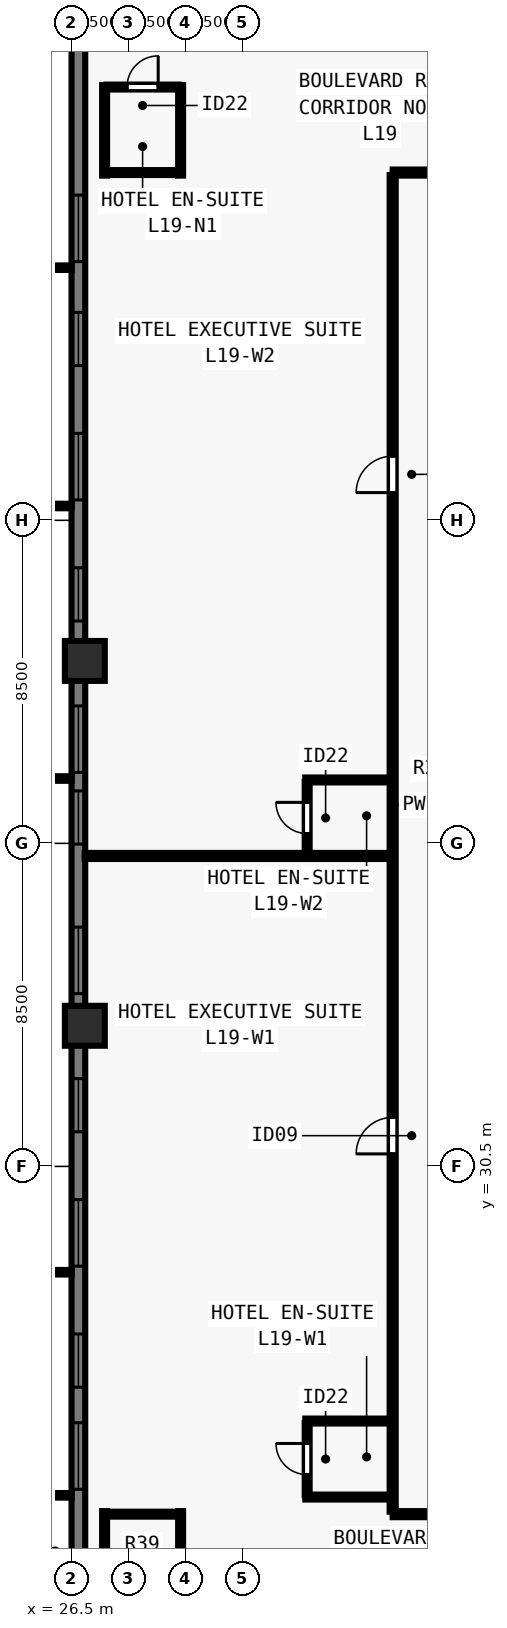
"""IFC4 building model, lengths in metres.
Left out: names, types, materials, properties, quantities, classifications, styles, units other than length and angle.
Written with IfcOpenShell. Run it as: python <this file> out.ifc"""

import sys

from ifc_helpers import new_model, si_unit, direction, frame, frame_2d, origin, origin_2d, place, context, subcontext, project, spatial, rectangle, extrude, element, fill, save


model = new_model("IFC4")
c1 = context("Model", 3, precision=1e-05, world=origin(), true_north=direction((0.0, 1.0)))
c2 = subcontext(c1, "Body", "Model", "MODEL_VIEW")
j1 = project(units=[si_unit("LENGTHUNIT", "METRE"), si_unit("PLANEANGLEUNIT", "RADIAN")], contexts=[c1])
p1 = place(None, origin())
s1 = spatial("IfcSite", under=j1, at=p1, CompositionType="ELEMENT")
p2 = place(p1, origin())
s2 = spatial("IfcBuilding", under=s1, at=p2, CompositionType="ELEMENT")
p3 = place(p2, frame((0.0, 0.0, 72.5)))
s3 = spatial("IfcBuildingStorey", under=s2, at=p3, CompositionType="ELEMENT", Elevation=72.5)
for number, where, z_axis, x_axis in (
    (1, (26.85, 43.8, 0.0), (0.0, 0.0, 1.0), (0.0, 1.0, 0.0)),
    (2, (26.85, 34.2, 0.0), (0.0, 0.0, 1.0), (0.0, 1.0, 0.0)),
):
    element("IfcColumn", number, at=place(p3, frame(where, z_axis=z_axis, x_axis=x_axis)), inside=s3, PredefinedType="COLUMN", context=c2, shape_type="SweptSolid", body=[
        extrude(rectangle(XDim=1.05, YDim=1.05, at=origin_2d()), origin(), (0.0, 0.0, 1.0), 3.5),
    ])
p4 = place(p3, frame((26.68, 16.5, 0.0), z_axis=(0.0, 0.0, 1.0), x_axis=(0.0, 1.0, 0.0)))
e3 = element("IfcWall", 3, at=p4, inside=s3, PredefinedType="SOLIDWALL", context=c2, shape_type="SweptSolid", body=[
    extrude(rectangle(XDim=44.662, YDim=0.36, at=frame_2d((22.331, 0.0))), origin(), (0.0, 0.0, 1.0), 3.28),
])
p5 = place(p4, frame((5.505, 0.0, 0.8)))
e4 = element("IfcOpeningElement", 4, at=p5, cuts=e3, PredefinedType="OPENING", context=c2, shape_type="SweptSolid", body=[
    extrude(rectangle(XDim=1.75, YDim=1.544, at=frame_2d((0.875, 0.772))), frame((0.0, 0.19, 0.0), z_axis=(0.0, -1.0, 0.0), x_axis=(1.0, 0.0, 0.0)), (0.0, 0.0, 1.0), 0.38),
])
p6 = place(p4, frame((8.19, 0.0, 0.8)))
e5 = element("IfcOpeningElement", 5, at=p6, cuts=e3, PredefinedType="OPENING", context=c2, shape_type="SweptSolid", body=[
    extrude(rectangle(XDim=1.4, YDim=1.544, at=frame_2d((0.7, 0.772))), frame((0.0, 0.19, 0.0), z_axis=(0.0, -1.0, 0.0), x_axis=(1.0, 0.0, 0.0)), (0.0, 0.0, 1.0), 0.38),
])
p7 = place(p4, frame((11.375, 0.0, 0.8)))
e6 = element("IfcOpeningElement", 6, at=p7, cuts=e3, PredefinedType="OPENING", context=c2, shape_type="SweptSolid", body=[
    extrude(rectangle(XDim=1.75, YDim=1.544, at=frame_2d((0.875, 0.772))), frame((0.0, 0.19, 0.0), z_axis=(0.0, -1.0, 0.0), x_axis=(1.0, 0.0, 0.0)), (0.0, 0.0, 1.0), 0.38),
])
p8 = place(p4, frame((14.911, 0.0, 0.8)))
e7 = element("IfcOpeningElement", 7, at=p8, cuts=e3, PredefinedType="OPENING", context=c2, shape_type="SweptSolid", body=[
    extrude(rectangle(XDim=1.4, YDim=1.544, at=frame_2d((0.7, 0.772))), frame((0.0, 0.19, 0.0), z_axis=(0.0, -1.0, 0.0), x_axis=(1.0, 0.0, 0.0)), (0.0, 0.0, 1.0), 0.38),
])
p9 = place(p4, frame((18.546, 0.0, 0.8)))
e8 = element("IfcOpeningElement", 8, at=p9, cuts=e3, PredefinedType="OPENING", context=c2, shape_type="SweptSolid", body=[
    extrude(rectangle(XDim=1.75, YDim=1.544, at=frame_2d((0.875, 0.772))), frame((0.0, 0.19, 0.0), z_axis=(0.0, -1.0, 0.0), x_axis=(1.0, 0.0, 0.0)), (0.0, 0.0, 1.0), 0.38),
])
p10 = place(p4, frame((22.481, 0.0, 0.8)))
e9 = element("IfcOpeningElement", 9, at=p10, cuts=e3, PredefinedType="OPENING", context=c2, shape_type="SweptSolid", body=[
    extrude(rectangle(XDim=1.4, YDim=1.544, at=frame_2d((0.7, 0.772))), frame((0.0, 0.19, 0.0), z_axis=(0.0, -1.0, 0.0), x_axis=(1.0, 0.0, 0.0)), (0.0, 0.0, 1.0), 0.38),
])
p11 = place(p4, frame((24.366, 0.0, 0.8)))
e10 = element("IfcOpeningElement", 10, at=p11, cuts=e3, PredefinedType="OPENING", context=c2, shape_type="SweptSolid", body=[
    extrude(rectangle(XDim=1.75, YDim=1.544, at=frame_2d((0.875, 0.772))), frame((0.0, 0.19, 0.0), z_axis=(0.0, -1.0, 0.0), x_axis=(1.0, 0.0, 0.0)), (0.0, 0.0, 1.0), 0.38),
])
p12 = place(p4, frame((28.351, 0.0, 0.8)))
e11 = element("IfcOpeningElement", 11, at=p12, cuts=e3, PredefinedType="OPENING", context=c2, shape_type="SweptSolid", body=[
    extrude(rectangle(XDim=1.4, YDim=1.544, at=frame_2d((0.7, 0.772))), frame((0.0, 0.19, 0.0), z_axis=(0.0, -1.0, 0.0), x_axis=(1.0, 0.0, 0.0)), (0.0, 0.0, 1.0), 0.38),
])
p13 = place(p4, frame((31.537, 0.0, 0.8)))
e12 = element("IfcOpeningElement", 12, at=p13, cuts=e3, PredefinedType="OPENING", context=c2, shape_type="SweptSolid", body=[
    extrude(rectangle(XDim=1.75, YDim=1.544, at=frame_2d((0.875, 0.772))), frame((0.0, 0.19, 0.0), z_axis=(0.0, -1.0, 0.0), x_axis=(1.0, 0.0, 0.0)), (0.0, 0.0, 1.0), 0.38),
])
p14 = place(p4, frame((35.072, 0.0, 0.8)))
e13 = element("IfcOpeningElement", 13, at=p14, cuts=e3, PredefinedType="OPENING", context=c2, shape_type="SweptSolid", body=[
    extrude(rectangle(XDim=1.4, YDim=1.544, at=frame_2d((0.7, 0.772))), frame((0.0, 0.19, 0.0), z_axis=(0.0, -1.0, 0.0), x_axis=(1.0, 0.0, 0.0)), (0.0, 0.0, 1.0), 0.38),
])
p15 = place(p4, frame((37.807, 0.0, 0.8)))
e14 = element("IfcOpeningElement", 14, at=p15, cuts=e3, PredefinedType="OPENING", context=c2, shape_type="SweptSolid", body=[
    extrude(rectangle(XDim=1.75, YDim=1.544, at=frame_2d((0.875, 0.772))), frame((0.0, 0.19, 0.0), z_axis=(0.0, -1.0, 0.0), x_axis=(1.0, 0.0, 0.0)), (0.0, 0.0, 1.0), 0.38),
])
p16 = place(p3, frame((34.95, 21.35, 0.0), z_axis=(0.0, 0.0, 1.0), x_axis=(1.0, 0.0, 0.0)))
e15 = element("IfcWall", 15, at=p16, inside=s3, PredefinedType="PARTITIONING", context=c2, shape_type="SweptSolid", body=[
    extrude(rectangle(XDim=34.1, YDim=0.16, at=frame_2d((17.05, 0.0))), origin(), (0.0, 0.0, 1.0), 3.28),
])
p17 = place(p16, frame((3.614, 0.0, 0.0)))
e16 = element("IfcOpeningElement", 16, at=p17, cuts=e15, PredefinedType="OPENING", context=c2, shape_type="SweptSolid", body=[
    extrude(rectangle(XDim=0.96, YDim=2.15, at=frame_2d((0.48, 1.075))), frame((0.0, 0.09, 0.0), z_axis=(0.0, -1.0, 0.0), x_axis=(1.0, 0.0, 0.0)), (0.0, 0.0, 1.0), 0.18),
])
p18 = place(p16, frame((17.56, 0.0, 0.0)))
e17 = element("IfcOpeningElement", 17, at=p18, cuts=e15, PredefinedType="OPENING", context=c2, shape_type="SweptSolid", body=[
    extrude(rectangle(XDim=0.96, YDim=2.15, at=frame_2d((0.48, 1.075))), frame((0.0, 0.09, 0.0), z_axis=(0.0, -1.0, 0.0), x_axis=(1.0, 0.0, 0.0)), (0.0, 0.0, 1.0), 0.18),
])
p19 = place(p16, frame((30.516, 0.0, 0.0)))
e18 = element("IfcOpeningElement", 18, at=p19, cuts=e15, PredefinedType="OPENING", context=c2, shape_type="SweptSolid", body=[
    extrude(rectangle(XDim=0.96, YDim=2.15, at=frame_2d((0.48, 1.075))), frame((0.0, 0.09, 0.0), z_axis=(0.0, -1.0, 0.0), x_axis=(1.0, 0.0, 0.0)), (0.0, 0.0, 1.0), 0.18),
])
p20 = place(p3, frame((34.95, 56.65, 0.0), z_axis=(0.0, 0.0, 1.0), x_axis=(1.0, 0.0, 0.0)))
e19 = element("IfcWall", 19, at=p20, inside=s3, PredefinedType="PARTITIONING", context=c2, shape_type="SweptSolid", body=[
    extrude(rectangle(XDim=34.1, YDim=0.16, at=frame_2d((17.05, 0.0))), origin(), (0.0, 0.0, 1.0), 3.28),
])
p21 = place(p20, frame((4.166, 0.0, 0.0)))
e20 = element("IfcOpeningElement", 20, at=p21, cuts=e19, PredefinedType="OPENING", context=c2, shape_type="SweptSolid", body=[
    extrude(rectangle(XDim=0.96, YDim=2.15, at=frame_2d((0.48, 1.075))), frame((0.0, 0.09, 0.0), z_axis=(0.0, -1.0, 0.0), x_axis=(1.0, 0.0, 0.0)), (0.0, 0.0, 1.0), 0.18),
])
p22 = place(p20, frame((17.73, 0.0, 0.0)))
e21 = element("IfcOpeningElement", 21, at=p22, cuts=e19, PredefinedType="OPENING", context=c2, shape_type="SweptSolid", body=[
    extrude(rectangle(XDim=0.96, YDim=2.15, at=frame_2d((0.48, 1.075))), frame((0.0, 0.09, 0.0), z_axis=(0.0, -1.0, 0.0), x_axis=(1.0, 0.0, 0.0)), (0.0, 0.0, 1.0), 0.18),
])
p23 = place(p20, frame((30.134, 0.0, 0.0)))
e22 = element("IfcOpeningElement", 22, at=p23, cuts=e19, PredefinedType="OPENING", context=c2, shape_type="SweptSolid", body=[
    extrude(rectangle(XDim=0.96, YDim=2.15, at=frame_2d((0.48, 1.075))), frame((0.0, 0.09, 0.0), z_axis=(0.0, -1.0, 0.0), x_axis=(1.0, 0.0, 0.0)), (0.0, 0.0, 1.0), 0.18),
])
p24 = place(p3, frame((34.95, 21.415, 0.0), z_axis=(0.0, 0.0, 1.0), x_axis=(0.0, 1.0, 0.0)))
e23 = element("IfcWall", 23, at=p24, inside=s3, PredefinedType="PARTITIONING", context=c2, shape_type="SweptSolid", body=[
    extrude(rectangle(XDim=35.17, YDim=0.16, at=frame_2d((17.585, 0.0))), origin(), (0.0, 0.0, 1.0), 3.28),
])
p25 = place(p24, frame((9.414, 0.0, 0.0)))
e24 = element("IfcOpeningElement", 24, at=p25, cuts=e23, PredefinedType="OPENING", context=c2, shape_type="SweptSolid", body=[
    extrude(rectangle(XDim=0.96, YDim=2.15, at=frame_2d((0.48, 1.075))), frame((0.0, 0.09, 0.0), z_axis=(0.0, -1.0, 0.0), x_axis=(1.0, 0.0, 0.0)), (0.0, 0.0, 1.0), 0.18),
])
p26 = place(p24, frame((26.814, 0.0, 0.0)))
e25 = element("IfcOpeningElement", 25, at=p26, cuts=e23, PredefinedType="OPENING", context=c2, shape_type="SweptSolid", body=[
    extrude(rectangle(XDim=0.96, YDim=2.15, at=frame_2d((0.48, 1.075))), frame((0.0, 0.09, 0.0), z_axis=(0.0, -1.0, 0.0), x_axis=(1.0, 0.0, 0.0)), (0.0, 0.0, 1.0), 0.18),
])
for number, where, z_axis, x_axis in (
    (26, (27.37, 19.05, 0.0), (0.0, 0.0, 1.0), (0.0, 1.0, 0.0)),
    (27, (29.37, 19.05, 0.0), (0.0, 0.0, 1.0), (0.0, 1.0, 0.0)),
):
    element("IfcWall", number, at=place(p3, frame(where, z_axis=z_axis, x_axis=x_axis)), inside=s3, PredefinedType="PLUMBINGWALL", context=c2, shape_type="SweptSolid", body=[
        extrude(rectangle(XDim=2.38, YDim=0.13, at=frame_2d((1.19, 0.0))), origin(), (0.0, 0.0, 1.0), 3.28),
    ])
p27 = place(p3, frame((27.42, 21.35, 0.0), z_axis=(0.0, 0.0, 1.0), x_axis=(1.0, 0.0, 0.0)))
e28 = element("IfcWall", 28, at=p27, inside=s3, PredefinedType="PLUMBINGWALL", context=c2, shape_type="SweptSolid", body=[
    extrude(rectangle(XDim=1.9, YDim=0.13, at=frame_2d((0.95, 0.0))), origin(), (0.0, 0.0, 1.0), 3.28),
])
for number, where, z_axis, x_axis in (
    (29, (27.37, 56.57, 0.0), (0.0, 0.0, 1.0), (0.0, 1.0, 0.0)),
    (30, (29.37, 56.57, 0.0), (0.0, 0.0, 1.0), (0.0, 1.0, 0.0)),
):
    element("IfcWall", number, at=place(p3, frame(where, z_axis=z_axis, x_axis=x_axis)), inside=s3, PredefinedType="PLUMBINGWALL", context=c2, shape_type="SweptSolid", body=[
        extrude(rectangle(XDim=2.38, YDim=0.13, at=frame_2d((1.19, 0.0))), origin(), (0.0, 0.0, 1.0), 3.28),
    ])
p28 = place(p3, frame((27.42, 58.9, 0.0), z_axis=(0.0, 0.0, 1.0), x_axis=(1.0, 0.0, 0.0)))
e31 = element("IfcWall", 31, at=p28, inside=s3, PredefinedType="PLUMBINGWALL", context=c2, shape_type="SweptSolid", body=[
    extrude(rectangle(XDim=1.9, YDim=0.13, at=frame_2d((0.95, 0.0))), origin(), (0.0, 0.0, 1.0), 3.28),
])
p29 = place(p28, frame((0.54, 0.0, 0.0)))
e32 = element("IfcOpeningElement", 32, at=p29, cuts=e31, PredefinedType="OPENING", context=c2, shape_type="SweptSolid", body=[
    extrude(rectangle(XDim=0.82, YDim=2.1, at=frame_2d((0.41, 1.05))), frame((0.0, 0.075, 0.0), z_axis=(0.0, -1.0, 0.0), x_axis=(1.0, 0.0, 0.0)), (0.0, 0.0, 1.0), 0.15),
])
p30 = place(p3, frame((27.42, 56.65, 0.0), z_axis=(0.0, 0.0, 1.0), x_axis=(1.0, 0.0, 0.0)))
e33 = element("IfcWall", 33, at=p30, inside=s3, PredefinedType="PLUMBINGWALL", context=c2, shape_type="SweptSolid", body=[
    extrude(rectangle(XDim=1.9, YDim=0.13, at=frame_2d((0.95, 0.0))), origin(), (0.0, 0.0, 1.0), 3.28),
])
p31 = place(p3, frame((32.65, 21.8, 0.0), z_axis=(0.0, 0.0, 1.0), x_axis=(1.0, 0.0, 0.0)))
e34 = element("IfcWall", 34, at=p31, inside=s3, PredefinedType="PLUMBINGWALL", context=c2, shape_type="SweptSolid", body=[
    extrude(rectangle(XDim=2.235, YDim=0.13, at=frame_2d((1.118, 0.0))), origin(), (0.0, 0.0, 1.0), 2.849),
])
p32 = place(p3, frame((32.65, 23.8, 0.0), z_axis=(0.0, 0.0, 1.0), x_axis=(1.0, 0.0, 0.0)))
e35 = element("IfcWall", 35, at=p32, inside=s3, PredefinedType="PLUMBINGWALL", context=c2, shape_type="SweptSolid", body=[
    extrude(rectangle(XDim=2.235, YDim=0.13, at=frame_2d((1.118, 0.0))), origin(), (0.0, 0.0, 1.0), 3.28),
])
p33 = place(p3, frame((32.7, 21.85, 0.0), z_axis=(0.0, 0.0, 1.0), x_axis=(0.0, 1.0, 0.0)))
e36 = element("IfcWall", 36, at=p33, inside=s3, PredefinedType="PLUMBINGWALL", context=c2, shape_type="SweptSolid", body=[
    extrude(rectangle(XDim=1.9, YDim=0.13, at=frame_2d((0.95, 0.0))), origin(), (0.0, 0.0, 1.0), 3.28),
])
p34 = place(p33, frame((0.54, 0.0, 0.0)))
e37 = element("IfcOpeningElement", 37, at=p34, cuts=e36, PredefinedType="OPENING", context=c2, shape_type="SweptSolid", body=[
    extrude(rectangle(XDim=0.82, YDim=2.1, at=frame_2d((0.41, 1.05))), frame((0.0, 0.075, 0.0), z_axis=(0.0, -1.0, 0.0), x_axis=(1.0, 0.0, 0.0)), (0.0, 0.0, 1.0), 0.15),
])
p35 = place(p3, frame((26.845, 38.668, 0.0), z_axis=(0.0, 0.0, 1.0), x_axis=(1.0, 0.0, 0.0)))
e38 = element("IfcWall", 38, at=p35, inside=s3, PredefinedType="PARTITIONING", context=c2, shape_type="SweptSolid", body=[
    extrude(rectangle(XDim=8.04, YDim=0.16, at=frame_2d((4.02, 0.0))), origin(), (0.0, 0.0, 1.0), 2.849),
])
p36 = place(p3, frame((32.65, 40.668, 0.0), z_axis=(0.0, 0.0, 1.0), x_axis=(1.0, 0.0, 0.0)))
e39 = element("IfcWall", 39, at=p36, inside=s3, PredefinedType="PLUMBINGWALL", context=c2, shape_type="SweptSolid", body=[
    extrude(rectangle(XDim=2.235, YDim=0.13, at=frame_2d((1.118, 0.0))), origin(), (0.0, 0.0, 1.0), 3.28),
])
p37 = place(p3, frame((32.7, 38.733, 0.0), z_axis=(0.0, 0.0, 1.0), x_axis=(0.0, 1.0, 0.0)))
e40 = element("IfcWall", 40, at=p37, inside=s3, PredefinedType="PLUMBINGWALL", context=c2, shape_type="SweptSolid", body=[
    extrude(rectangle(XDim=1.885, YDim=0.13, at=frame_2d((0.942, 0.0))), origin(), (0.0, 0.0, 1.0), 3.28),
])
p38 = place(p37, frame((0.525, 0.0, 0.0)))
e41 = element("IfcOpeningElement", 41, at=p38, cuts=e40, PredefinedType="OPENING", context=c2, shape_type="SweptSolid", body=[
    extrude(rectangle(XDim=0.82, YDim=2.1, at=frame_2d((0.41, 1.05))), frame((0.0, 0.075, 0.0), z_axis=(0.0, -1.0, 0.0), x_axis=(1.0, 0.0, 0.0)), (0.0, 0.0, 1.0), 0.15),
])
p39 = place(p5, origin())
e42 = element("IfcWindow", 42, at=p39, inside=s3, PartitioningType="SINGLE_PANEL", PredefinedType="WINDOW", context=c2, shape_type="SweptSolid", body=[
    extrude(rectangle(XDim=1.75, YDim=1.544, at=frame_2d((0.875, 0.772))), frame((0.0, -0.05, 0.0), z_axis=(0.0, -1.0, 0.0), x_axis=(1.0, 0.0, 0.0)), (0.0, 0.0, 1.0), 0.06),
])
fill(e4, e42)
p40 = place(p6, origin())
e43 = element("IfcWindow", 43, at=p40, inside=s3, PartitioningType="SINGLE_PANEL", PredefinedType="WINDOW", context=c2, shape_type="SweptSolid", body=[
    extrude(rectangle(XDim=1.4, YDim=1.544, at=frame_2d((0.7, 0.772))), frame((0.0, -0.05, 0.0), z_axis=(0.0, -1.0, 0.0), x_axis=(1.0, 0.0, 0.0)), (0.0, 0.0, 1.0), 0.06),
])
fill(e5, e43)
p41 = place(p7, origin())
e44 = element("IfcWindow", 44, at=p41, inside=s3, PartitioningType="SINGLE_PANEL", PredefinedType="WINDOW", context=c2, shape_type="SweptSolid", body=[
    extrude(rectangle(XDim=1.75, YDim=1.544, at=frame_2d((0.875, 0.772))), frame((0.0, -0.05, 0.0), z_axis=(0.0, -1.0, 0.0), x_axis=(1.0, 0.0, 0.0)), (0.0, 0.0, 1.0), 0.06),
])
fill(e6, e44)
p42 = place(p8, origin())
e45 = element("IfcWindow", 45, at=p42, inside=s3, PartitioningType="SINGLE_PANEL", PredefinedType="WINDOW", context=c2, shape_type="SweptSolid", body=[
    extrude(rectangle(XDim=1.4, YDim=1.544, at=frame_2d((0.7, 0.772))), frame((0.0, -0.05, 0.0), z_axis=(0.0, -1.0, 0.0), x_axis=(1.0, 0.0, 0.0)), (0.0, 0.0, 1.0), 0.06),
])
fill(e7, e45)
p43 = place(p9, origin())
e46 = element("IfcWindow", 46, at=p43, inside=s3, PartitioningType="SINGLE_PANEL", PredefinedType="WINDOW", context=c2, shape_type="SweptSolid", body=[
    extrude(rectangle(XDim=1.75, YDim=1.544, at=frame_2d((0.875, 0.772))), frame((0.0, -0.05, 0.0), z_axis=(0.0, -1.0, 0.0), x_axis=(1.0, 0.0, 0.0)), (0.0, 0.0, 1.0), 0.06),
])
fill(e8, e46)
p44 = place(p10, origin())
e47 = element("IfcWindow", 47, at=p44, inside=s3, PartitioningType="SINGLE_PANEL", PredefinedType="WINDOW", context=c2, shape_type="SweptSolid", body=[
    extrude(rectangle(XDim=1.4, YDim=1.544, at=frame_2d((0.7, 0.772))), frame((0.0, -0.05, 0.0), z_axis=(0.0, -1.0, 0.0), x_axis=(1.0, 0.0, 0.0)), (0.0, 0.0, 1.0), 0.06),
])
fill(e9, e47)
p45 = place(p11, origin())
e48 = element("IfcWindow", 48, at=p45, inside=s3, PartitioningType="SINGLE_PANEL", PredefinedType="WINDOW", context=c2, shape_type="SweptSolid", body=[
    extrude(rectangle(XDim=1.75, YDim=1.544, at=frame_2d((0.875, 0.772))), frame((0.0, -0.05, 0.0), z_axis=(0.0, -1.0, 0.0), x_axis=(1.0, 0.0, 0.0)), (0.0, 0.0, 1.0), 0.06),
])
fill(e10, e48)
p46 = place(p12, origin())
e49 = element("IfcWindow", 49, at=p46, inside=s3, PartitioningType="SINGLE_PANEL", PredefinedType="WINDOW", context=c2, shape_type="SweptSolid", body=[
    extrude(rectangle(XDim=1.4, YDim=1.544, at=frame_2d((0.7, 0.772))), frame((0.0, -0.05, 0.0), z_axis=(0.0, -1.0, 0.0), x_axis=(1.0, 0.0, 0.0)), (0.0, 0.0, 1.0), 0.06),
])
fill(e11, e49)
p47 = place(p13, origin())
e50 = element("IfcWindow", 50, at=p47, inside=s3, PartitioningType="SINGLE_PANEL", PredefinedType="WINDOW", context=c2, shape_type="SweptSolid", body=[
    extrude(rectangle(XDim=1.75, YDim=1.544, at=frame_2d((0.875, 0.772))), frame((0.0, -0.05, 0.0), z_axis=(0.0, -1.0, 0.0), x_axis=(1.0, 0.0, 0.0)), (0.0, 0.0, 1.0), 0.06),
])
fill(e12, e50)
p48 = place(p14, origin())
e51 = element("IfcWindow", 51, at=p48, inside=s3, PartitioningType="SINGLE_PANEL", PredefinedType="WINDOW", context=c2, shape_type="SweptSolid", body=[
    extrude(rectangle(XDim=1.4, YDim=1.544, at=frame_2d((0.7, 0.772))), frame((0.0, -0.05, 0.0), z_axis=(0.0, -1.0, 0.0), x_axis=(1.0, 0.0, 0.0)), (0.0, 0.0, 1.0), 0.06),
])
fill(e13, e51)
p49 = place(p15, origin())
e52 = element("IfcWindow", 52, at=p49, inside=s3, PartitioningType="SINGLE_PANEL", PredefinedType="WINDOW", context=c2, shape_type="SweptSolid", body=[
    extrude(rectangle(XDim=1.75, YDim=1.544, at=frame_2d((0.875, 0.772))), frame((0.0, -0.05, 0.0), z_axis=(0.0, -1.0, 0.0), x_axis=(1.0, 0.0, 0.0)), (0.0, 0.0, 1.0), 0.06),
])
fill(e14, e52)
p50 = place(p29, origin())
e53 = element("IfcDoor", 53, at=p50, inside=s3, OperationType="SINGLE_SWING_RIGHT", PredefinedType="DOOR", context=c2, shape_type="SweptSolid", body=[
    extrude(rectangle(XDim=0.82, YDim=2.1, at=frame_2d((0.41, 1.05))), frame((0.0, 0.025, 0.0), z_axis=(0.0, -1.0, 0.0), x_axis=(1.0, 0.0, 0.0)), (0.0, 0.0, 1.0), 0.05),
])
fill(e32, e53)
p51 = place(p34, origin())
e54 = element("IfcDoor", 54, at=p51, inside=s3, OperationType="SINGLE_SWING_RIGHT", PredefinedType="DOOR", context=c2, shape_type="SweptSolid", body=[
    extrude(rectangle(XDim=0.82, YDim=2.1, at=frame_2d((0.41, 1.05))), frame((0.0, 0.025, 0.0), z_axis=(0.0, -1.0, 0.0), x_axis=(1.0, 0.0, 0.0)), (0.0, 0.0, 1.0), 0.05),
])
fill(e37, e54)
p52 = place(p25, origin())
e55 = element("IfcDoor", 55, at=p52, inside=s3, OperationType="SINGLE_SWING_LEFT", PredefinedType="DOOR", context=c2, shape_type="SweptSolid", body=[
    extrude(rectangle(XDim=0.96, YDim=2.15, at=frame_2d((0.48, 1.075))), frame((0.0, 0.025, 0.0), z_axis=(0.0, -1.0, 0.0), x_axis=(1.0, 0.0, 0.0)), (0.0, 0.0, 1.0), 0.05),
])
fill(e24, e55)
p53 = place(p38, origin())
e56 = element("IfcDoor", 56, at=p53, inside=s3, OperationType="SINGLE_SWING_RIGHT", PredefinedType="DOOR", context=c2, shape_type="SweptSolid", body=[
    extrude(rectangle(XDim=0.82, YDim=2.1, at=frame_2d((0.41, 1.05))), frame((0.0, 0.025, 0.0), z_axis=(0.0, -1.0, 0.0), x_axis=(1.0, 0.0, 0.0)), (0.0, 0.0, 1.0), 0.05),
])
fill(e41, e56)
p54 = place(p26, origin())
e57 = element("IfcDoor", 57, at=p54, inside=s3, OperationType="SINGLE_SWING_LEFT", PredefinedType="DOOR", context=c2, shape_type="SweptSolid", body=[
    extrude(rectangle(XDim=0.96, YDim=2.15, at=frame_2d((0.48, 1.075))), frame((0.0, 0.025, 0.0), z_axis=(0.0, -1.0, 0.0), x_axis=(1.0, 0.0, 0.0)), (0.0, 0.0, 1.0), 0.05),
])
fill(e25, e57)
save(model, sys.argv[1])
